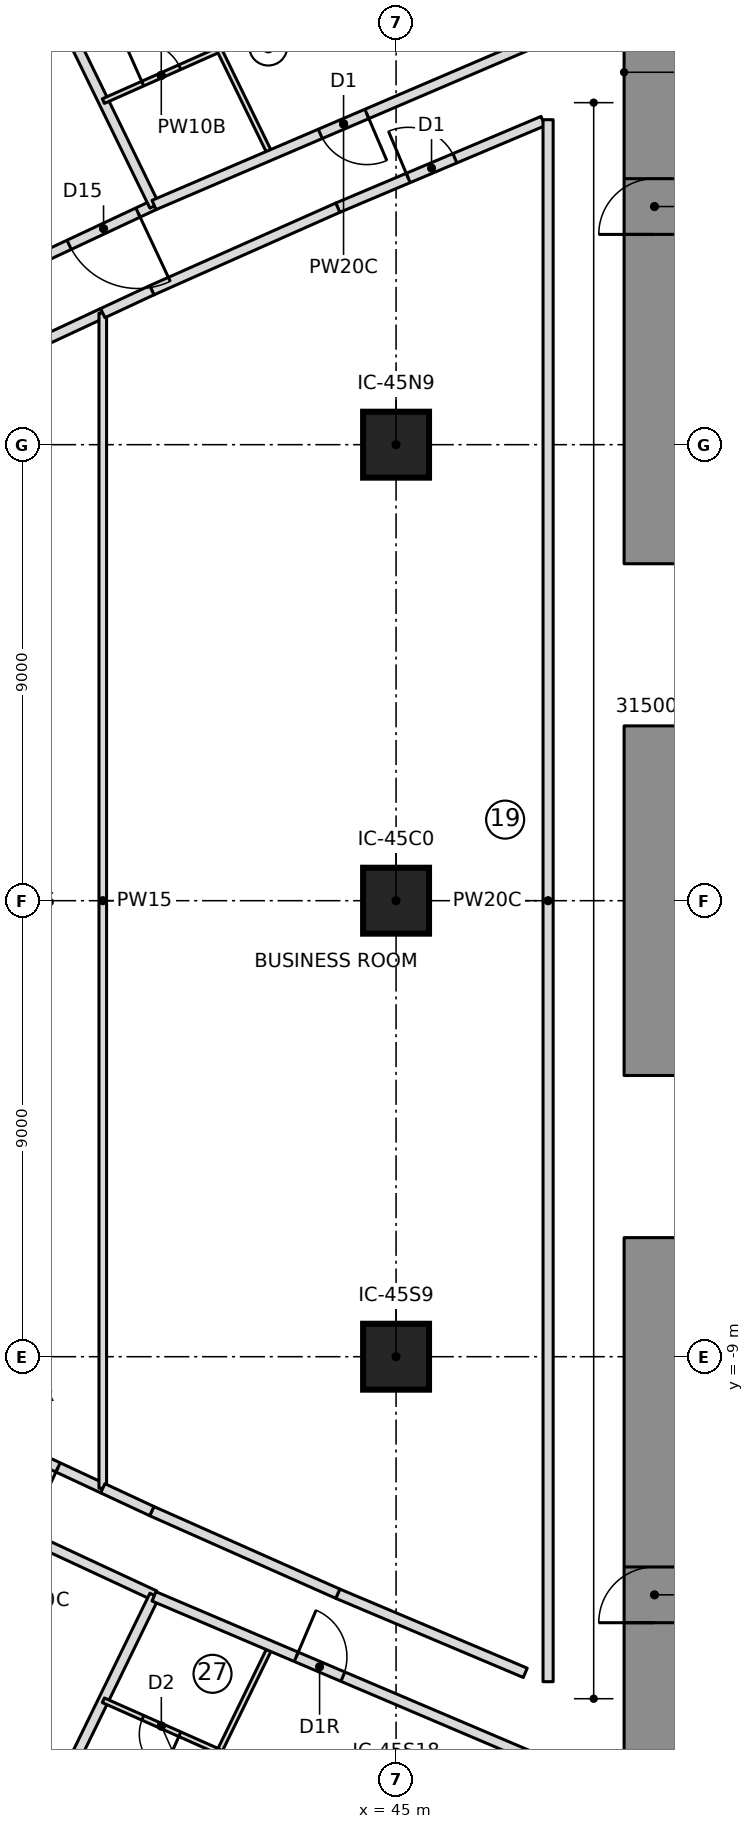
"""IFC4 building model, lengths in metres.
Left out: names, types, materials, properties, quantities, classifications, styles, units other than length and angle.
Written with IfcOpenShell. Run it as: python <this file> out.ifc"""

import sys

from ifc_helpers import new_model, si_unit, direction, frame, frame_2d, origin, origin_2d, place, context, subcontext, project, spatial, rectangle, extrude, element, fill, save


model = new_model("IFC4")
c1 = context("Model", 3, precision=1e-05, world=origin(), true_north=direction((0.0, 1.0)))
c2 = subcontext(c1, "Body", "Model", "MODEL_VIEW")
j1 = project(units=[si_unit("LENGTHUNIT", "METRE"), si_unit("PLANEANGLEUNIT", "RADIAN")], contexts=[c1])
p1 = place(None, origin())
s1 = spatial("IfcSite", under=j1, at=p1, CompositionType="ELEMENT")
p2 = place(p1, origin())
s2 = spatial("IfcBuilding", under=s1, at=p2, CompositionType="ELEMENT")
p3 = place(p2, frame((0.0, 0.0, 53.8)))
s3 = spatial("IfcBuildingStorey", under=s2, at=p3, CompositionType="ELEMENT", Elevation=53.8)
p4 = place(p3, frame((50.1, 6.65, 0.0), z_axis=(0.0, 0.0, 1.0), x_axis=(0.0, 1.0, 0.0)))
e1 = element("IfcWall", 1, at=p4, inside=s3, PredefinedType="SHEAR", context=c2, shape_type="SweptSolid", body=[
    extrude(rectangle(XDim=10.3, YDim=1.2, at=frame_2d((5.15, 0.0))), origin(), (0.0, 0.0, 1.0), 3.55),
])
p5 = place(p4, frame((6.5, 0.0, 0.0)))
e2 = element("IfcOpeningElement", 2, at=p5, cuts=e1, PredefinedType="OPENING", context=c2, shape_type="SweptSolid", body=[
    extrude(rectangle(XDim=1.1, YDim=2.1, at=frame_2d((0.55, 1.05))), frame((0.0, 0.61, 0.0), z_axis=(0.0, -1.0, 0.0), x_axis=(1.0, 0.0, 0.0)), (0.0, 0.0, 1.0), 1.22),
])
p6 = place(p3, frame((50.1, -3.45, 0.0), z_axis=(0.0, 0.0, 1.0), x_axis=(0.0, 1.0, 0.0)))
e3 = element("IfcWall", 3, at=p6, inside=s3, PredefinedType="SHEAR", context=c2, shape_type="SweptSolid", body=[
    extrude(rectangle(XDim=6.9, YDim=1.2, at=frame_2d((3.45, 0.0))), origin(), (0.0, 0.0, 1.0), 3.55),
])
p7 = place(p3, frame((50.1, -16.95, 0.0), z_axis=(0.0, 0.0, 1.0), x_axis=(0.0, 1.0, 0.0)))
e4 = element("IfcWall", 4, at=p7, inside=s3, PredefinedType="SHEAR", context=c2, shape_type="SweptSolid", body=[
    extrude(rectangle(XDim=10.3, YDim=1.2, at=frame_2d((5.15, 0.0))), origin(), (0.0, 0.0, 1.0), 3.55),
])
p8 = place(p7, frame((2.7, 0.0, 0.0)))
e5 = element("IfcOpeningElement", 5, at=p8, cuts=e4, PredefinedType="OPENING", context=c2, shape_type="SweptSolid", body=[
    extrude(rectangle(XDim=1.1, YDim=2.1, at=frame_2d((0.55, 1.05))), frame((0.0, 0.61, 0.0), z_axis=(0.0, -1.0, 0.0), x_axis=(1.0, 0.0, 0.0)), (0.0, 0.0, 1.0), 1.22),
])
for number, where, z_axis, x_axis in (
    (6, (45.0, -9.0, 0.0), (0.0, 0.0, 1.0), (1.0, 0.0, 0.0)),
    (7, (45.0, 0.0, 0.0), (0.0, 0.0, 1.0), (1.0, 0.0, 0.0)),
    (8, (45.0, 9.0, 0.0), (0.0, 0.0, 1.0), (1.0, 0.0, 0.0)),
):
    element("IfcColumn", number, at=place(p3, frame(where, z_axis=z_axis, x_axis=x_axis)), inside=s3, PredefinedType="COLUMN", context=c2, shape_type="SweptSolid", body=[
        extrude(rectangle(XDim=1.3, YDim=1.3, at=origin_2d()), origin(), (0.0, 0.0, 1.0), 3.55),
    ])
p9 = place(p3, frame((40.223, 13.73, 0.0), z_axis=(0.0, 0.0, 1.0), x_axis=(-0.905363217407, -0.424638015923, 0.0)))
e9 = element("IfcWall", 9, at=p9, inside=s3, PredefinedType="PARTITIONING", context=c2, shape_type="SweptSolid", body=[
    extrude(rectangle(XDim=6.312, YDim=0.2, at=frame_2d((3.156, 0.0))), origin(), (0.0, 0.0, 1.0), 3.25),
])
p10 = place(p9, frame((0.35, 0.0, 0.0)))
e10 = element("IfcOpeningElement", 10, at=p10, cuts=e9, PredefinedType="OPENING", context=c2, shape_type="SweptSolid", body=[
    extrude(rectangle(XDim=1.5, YDim=2.1, at=frame_2d((0.75, 1.05))), frame((0.0, 0.11, 0.0), z_axis=(0.0, -1.0, 0.0), x_axis=(1.0, 0.0, 0.0)), (0.0, 0.0, 1.0), 0.22),
])
p11 = place(p3, frame((40.232, 13.712, 0.0), z_axis=(0.0, 0.0, 1.0), x_axis=(-0.438202247191, 0.898876404494, 0.0)))
e11 = element("IfcWall", 11, at=p11, inside=s3, PredefinedType="PARTITIONING", context=c2, shape_type="SweptSolid", body=[
    extrude(rectangle(XDim=7.605, YDim=0.2, at=frame_2d((3.802, 0.0))), origin(), (0.0, 0.0, 1.0), 3.25),
])
p12 = place(p3, frame((39.223, 15.781, 0.0), z_axis=(0.0, 0.0, 1.0), x_axis=(0.914000607553, 0.405712816401, 0.0)))
e12 = element("IfcWall", 12, at=p12, inside=s3, PredefinedType="PARTITIONING", context=c2, shape_type="SweptSolid", body=[
    extrude(rectangle(XDim=2.501, YDim=0.1, at=frame_2d((1.251, 0.0))), origin(), (0.0, 0.0, 1.0), 3.25),
])
p13 = place(p12, frame((0.85, 0.0, 0.0)))
e13 = element("IfcOpeningElement", 13, at=p13, cuts=e12, PredefinedType="OPENING", context=c2, shape_type="SweptSolid", body=[
    extrude(rectangle(XDim=0.8, YDim=2.1, at=frame_2d((0.4, 1.05))), frame((0.0, 0.06, 0.0), z_axis=(0.0, -1.0, 0.0), x_axis=(1.0, 0.0, 0.0)), (0.0, 0.0, 1.0), 0.12),
])
p14 = place(p3, frame((41.51, 16.796, 0.0), z_axis=(0.0, 0.0, 1.0), x_axis=(0.4381470535, -0.898903309321, 0.0)))
e14 = element("IfcWall", 14, at=p14, inside=s3, PredefinedType="PARTITIONING", context=c2, shape_type="SweptSolid", body=[
    extrude(rectangle(XDim=2.278, YDim=0.1, at=frame_2d((1.139, 0.0))), origin(), (0.0, 0.0, 1.0), 3.25),
])
p15 = place(p3, frame((34.509, -11.05, 0.0), z_axis=(0.0, 0.0, 1.0), x_axis=(0.906710104698, -0.421754414368, 0.0)))
e15 = element("IfcWall", 15, at=p15, inside=s3, PredefinedType="PARTITIONING", context=c2, shape_type="SweptSolid", body=[
    extrude(rectangle(XDim=6.312, YDim=0.2, at=frame_2d((3.156, 0.0))), origin(), (0.0, 0.0, 1.0), 3.25),
])
p16 = place(p15, frame((0.9, 0.0, 0.0)))
e16 = element("IfcOpeningElement", 16, at=p16, cuts=e15, PredefinedType="OPENING", context=c2, shape_type="SweptSolid", body=[
    extrude(rectangle(XDim=1.5, YDim=2.1, at=frame_2d((0.75, 1.05))), frame((0.0, 0.11, 0.0), z_axis=(0.0, -1.0, 0.0), x_axis=(1.0, 0.0, 0.0)), (0.0, 0.0, 1.0), 0.22),
])
p17 = place(p3, frame((36.899, -20.548, 0.0), z_axis=(0.0, 0.0, 1.0), x_axis=(0.438202247191, 0.898876404494, 0.0)))
e17 = element("IfcWall", 17, at=p17, inside=s3, PredefinedType="PARTITIONING", context=c2, shape_type="SweptSolid", body=[
    extrude(rectangle(XDim=7.605, YDim=0.2, at=frame_2d((3.802, 0.0))), origin(), (0.0, 0.0, 1.0), 3.25),
])
p18 = place(p3, frame((42.508, -14.748, 0.0), z_axis=(0.0, 0.0, 1.0), x_axis=(-0.4381470535, -0.898903309321, 0.0)))
e18 = element("IfcWall", 18, at=p18, inside=s3, PredefinedType="PARTITIONING", context=c2, shape_type="SweptSolid", body=[
    extrude(rectangle(XDim=2.278, YDim=0.1, at=frame_2d((1.139, 0.0))), origin(), (0.0, 0.0, 1.0), 3.25),
])
p19 = place(p3, frame((41.51, -16.796, 0.0), z_axis=(0.0, 0.0, 1.0), x_axis=(-0.914000607553, 0.405712816401, 0.0)))
e19 = element("IfcWall", 19, at=p19, inside=s3, PredefinedType="PARTITIONING", context=c2, shape_type="SweptSolid", body=[
    extrude(rectangle(XDim=2.501, YDim=0.1, at=frame_2d((1.251, 0.0))), origin(), (0.0, 0.0, 1.0), 3.25),
])
p20 = place(p19, frame((0.85, 0.0, 0.0)))
e20 = element("IfcOpeningElement", 20, at=p20, cuts=e19, PredefinedType="OPENING", context=c2, shape_type="SweptSolid", body=[
    extrude(rectangle(XDim=0.8, YDim=2.1, at=frame_2d((0.4, 1.05))), frame((0.0, 0.06, 0.0), z_axis=(0.0, -1.0, 0.0), x_axis=(1.0, 0.0, 0.0)), (0.0, 0.0, 1.0), 0.12),
])
p21 = place(p3, frame((39.212, -11.597, 0.0), z_axis=(0.0, 0.0, 1.0), x_axis=(-0.906348100281, 0.422531798943, 0.0)))
e21 = element("IfcWall", 21, at=p21, inside=s3, PredefinedType="PARTITIONING", context=c2, shape_type="SweptSolid", body=[
    extrude(rectangle(XDim=2.948, YDim=0.2, at=frame_2d((1.474, 0.0))), origin(), (0.0, 0.0, 1.0), 3.25),
])
p22 = place(p21, frame((0.974, 0.0, 0.0)))
e22 = element("IfcOpeningElement", 22, at=p22, cuts=e21, PredefinedType="OPENING", context=c2, shape_type="SweptSolid", body=[
    extrude(rectangle(XDim=1.0, YDim=2.1, at=frame_2d((0.5, 1.05))), frame((0.0, 0.11, 0.0), z_axis=(0.0, -1.0, 0.0), x_axis=(1.0, 0.0, 0.0)), (0.0, 0.0, 1.0), 0.22),
])
p23 = place(p3, frame((36.54, 10.351, 0.0), z_axis=(0.0, 0.0, 1.0), x_axis=(0.906348100281, 0.422531798943, 0.0)))
e23 = element("IfcWall", 23, at=p23, inside=s3, PredefinedType="PARTITIONING", context=c2, shape_type="SweptSolid", body=[
    extrude(rectangle(XDim=2.948, YDim=0.2, at=frame_2d((1.474, 0.0))), origin(), (0.0, 0.0, 1.0), 3.25),
])
p24 = place(p3, frame((39.212, -11.597, 0.0), z_axis=(0.0, 0.0, 1.0), x_axis=(0.0, 1.0, 0.0)))
e24 = element("IfcWall", 24, at=p24, inside=s3, PredefinedType="PARTITIONING", context=c2, shape_type="SweptSolid", body=[
    extrude(rectangle(XDim=23.193, YDim=0.15, at=frame_2d((11.597, 0.0))), origin(), (0.0, 0.0, 1.0), 3.25),
])
p25 = place(p3, frame((43.85, 13.677, 0.0), z_axis=(0.0, 0.0, 1.0), x_axis=(0.921265924084, 0.388933281068, 0.0)))
e25 = element("IfcWall", 25, at=p25, inside=s3, PredefinedType="PARTITIONING", context=c2, shape_type="SweptSolid", body=[
    extrude(rectangle(XDim=4.396, YDim=0.2, at=frame_2d((2.198, 0.0))), origin(), (0.0, 0.0, 1.0), 3.25),
])
p26 = place(p25, frame((1.508, 0.0, 0.0)))
e26 = element("IfcOpeningElement", 26, at=p26, cuts=e25, PredefinedType="OPENING", context=c2, shape_type="SweptSolid", body=[
    extrude(rectangle(XDim=1.0, YDim=2.1, at=frame_2d((0.5, 1.05))), frame((0.0, 0.11, 0.0), z_axis=(0.0, -1.0, 0.0), x_axis=(1.0, 0.0, 0.0)), (0.0, 0.0, 1.0), 0.22),
])
p27 = place(p3, frame((40.18, 12.048, 0.0), z_axis=(0.0, 0.0, 1.0), x_axis=(0.913986953061, 0.405743576209, 0.0)))
e27 = element("IfcWall", 27, at=p27, inside=s3, PredefinedType="PARTITIONING", context=c2, shape_type="SweptSolid", body=[
    extrude(rectangle(XDim=4.016, YDim=0.2, at=frame_2d((2.008, 0.0))), origin(), (0.0, 0.0, 1.0), 3.25),
])
p28 = place(p3, frame((47.55, -15.239, 0.0), z_axis=(0.0, 0.0, 1.0), x_axis=(-0.921269894054, 0.388923877269, 0.0)))
e28 = element("IfcWall", 28, at=p28, inside=s3, PredefinedType="PARTITIONING", context=c2, shape_type="SweptSolid", body=[
    extrude(rectangle(XDim=4.016, YDim=0.2, at=frame_2d((2.008, 0.0))), origin(), (0.0, 0.0, 1.0), 3.25),
])
p29 = place(p3, frame((43.85, -13.677, 0.0), z_axis=(0.0, 0.0, 1.0), x_axis=(-0.913986953061, 0.405743576209, 0.0)))
e29 = element("IfcWall", 29, at=p29, inside=s3, PredefinedType="PARTITIONING", context=c2, shape_type="SweptSolid", body=[
    extrude(rectangle(XDim=4.016, YDim=0.2, at=frame_2d((2.008, 0.0))), origin(), (0.0, 0.0, 1.0), 3.25),
])
for number, where, z_axis, x_axis in (
    (30, (40.18, -12.048, 0.0), (0.0, 0.0, 1.0), (-0.906, 0.423, 0.0)),
    (31, (39.212, 11.597, 0.0), (0.0, 0.0, 1.0), (0.906, 0.423, 0.0)),
):
    element("IfcWall", number, at=place(p3, frame(where, z_axis=z_axis, x_axis=x_axis)), inside=s3, PredefinedType="PARTITIONING", context=c2, shape_type="SweptSolid", body=[
        extrude(rectangle(XDim=1.068, YDim=0.2, at=frame_2d((0.534, 0.0))), origin(), (0.0, 0.0, 1.0), 3.25),
    ])
p30 = place(p3, frame((47.704, 16.931, 0.0), z_axis=(0.0, 0.0, 1.0), x_axis=(-0.919360612497, -0.39341589214, 0.0)))
e32 = element("IfcWall", 32, at=p30, inside=s3, PredefinedType="PARTITIONING", context=c2, shape_type="SweptSolid", body=[
    extrude(rectangle(XDim=8.137, YDim=0.2, at=frame_2d((4.068, 0.0))), origin(), (0.0, 0.0, 1.0), 3.25),
])
p31 = place(p30, frame((3.568, 0.0, 0.0)))
e33 = element("IfcOpeningElement", 33, at=p31, cuts=e32, PredefinedType="OPENING", context=c2, shape_type="SweptSolid", body=[
    extrude(rectangle(XDim=1.0, YDim=2.1, at=frame_2d((0.5, 1.05))), frame((0.0, 0.11, 0.0), z_axis=(0.0, -1.0, 0.0), x_axis=(1.0, 0.0, 0.0)), (0.0, 0.0, 1.0), 0.22),
])
p32 = place(p3, frame((40.223, -13.73, 0.0), z_axis=(0.0, 0.0, 1.0), x_axis=(0.920292261621, -0.391231585127, 0.0)))
e34 = element("IfcWall", 34, at=p32, inside=s3, PredefinedType="PARTITIONING", context=c2, shape_type="SweptSolid", body=[
    extrude(rectangle(XDim=8.129, YDim=0.2, at=frame_2d((4.064, 0.0))), origin(), (0.0, 0.0, 1.0), 3.25),
])
p33 = place(p32, frame((3.05, 0.0, 0.0)))
e35 = element("IfcOpeningElement", 35, at=p33, cuts=e34, PredefinedType="OPENING", context=c2, shape_type="SweptSolid", body=[
    extrude(rectangle(XDim=1.0, YDim=2.1, at=frame_2d((0.5, 1.05))), frame((0.0, 0.11, 0.0), z_axis=(0.0, -1.0, 0.0), x_axis=(1.0, 0.0, 0.0)), (0.0, 0.0, 1.0), 0.22),
])
p34 = place(p3, frame((48.0, 15.414, 0.0), z_axis=(0.0, 0.0, 1.0), x_axis=(0.0, -1.0, 0.0)))
e36 = element("IfcWall", 36, at=p34, inside=s3, PredefinedType="PARTITIONING", context=c2, shape_type="SweptSolid", body=[
    extrude(rectangle(XDim=30.828, YDim=0.2, at=frame_2d((15.414, 0.0))), origin(), (0.0, 0.0, 1.0), 3.25),
])
p35 = place(p10, origin())
e37 = element("IfcDoor", 37, at=p35, inside=s3, OperationType="DOUBLE_DOOR_SINGLE_SWING", PredefinedType="DOOR", context=c2, shape_type="SweptSolid", body=[
    extrude(rectangle(XDim=1.5, YDim=2.1, at=frame_2d((0.75, 1.05))), frame((0.0, 0.025, 0.0), z_axis=(0.0, -1.0, 0.0), x_axis=(1.0, 0.0, 0.0)), (0.0, 0.0, 1.0), 0.05),
])
fill(e10, e37)
p36 = place(p13, origin())
e38 = element("IfcDoor", 38, at=p36, inside=s3, OperationType="SINGLE_SWING_LEFT", PredefinedType="DOOR", context=c2, shape_type="SweptSolid", body=[
    extrude(rectangle(XDim=0.8, YDim=2.1, at=frame_2d((0.4, 1.05))), frame((0.0, 0.025, 0.0), z_axis=(0.0, -1.0, 0.0), x_axis=(1.0, 0.0, 0.0)), (0.0, 0.0, 1.0), 0.05),
])
fill(e13, e38)
p37 = place(p31, origin())
e39 = element("IfcDoor", 39, at=p37, inside=s3, OperationType="SINGLE_SWING_LEFT", PredefinedType="DOOR", context=c2, shape_type="SweptSolid", body=[
    extrude(rectangle(XDim=1.0, YDim=2.1, at=frame_2d((0.5, 1.05))), frame((0.0, 0.025, 0.0), z_axis=(0.0, -1.0, 0.0), x_axis=(1.0, 0.0, 0.0)), (0.0, 0.0, 1.0), 0.05),
])
fill(e33, e39)
p38 = place(p20, origin())
e40 = element("IfcDoor", 40, at=p38, inside=s3, OperationType="SINGLE_SWING_LEFT", PredefinedType="DOOR", context=c2, shape_type="SweptSolid", body=[
    extrude(rectangle(XDim=0.8, YDim=2.1, at=frame_2d((0.4, 1.05))), frame((0.0, 0.025, 0.0), z_axis=(0.0, -1.0, 0.0), x_axis=(1.0, 0.0, 0.0)), (0.0, 0.0, 1.0), 0.05),
])
fill(e20, e40)
p39 = place(p33, origin())
e41 = element("IfcDoor", 41, at=p39, inside=s3, OperationType="SINGLE_SWING_RIGHT", PredefinedType="DOOR", context=c2, shape_type="SweptSolid", body=[
    extrude(rectangle(XDim=1.0, YDim=2.1, at=frame_2d((0.5, 1.05))), frame((0.0, 0.025, 0.0), z_axis=(0.0, -1.0, 0.0), x_axis=(1.0, 0.0, 0.0)), (0.0, 0.0, 1.0), 0.05),
])
fill(e35, e41)
p40 = place(p22, origin())
e42 = element("IfcDoor", 42, at=p40, inside=s3, OperationType="SINGLE_SWING_RIGHT", PredefinedType="DOOR", context=c2, shape_type="SweptSolid", body=[
    extrude(rectangle(XDim=1.0, YDim=2.1, at=frame_2d((0.5, 1.05))), frame((0.0, 0.025, 0.0), z_axis=(0.0, -1.0, 0.0), x_axis=(1.0, 0.0, 0.0)), (0.0, 0.0, 1.0), 0.05),
])
fill(e22, e42)
p41 = place(p26, origin())
e43 = element("IfcDoor", 43, at=p41, inside=s3, OperationType="SINGLE_SWING_LEFT", PredefinedType="DOOR", context=c2, shape_type="SweptSolid", body=[
    extrude(rectangle(XDim=1.0, YDim=2.1, at=frame_2d((0.5, 1.05))), frame((0.0, 0.025, 0.0), z_axis=(0.0, -1.0, 0.0), x_axis=(1.0, 0.0, 0.0)), (0.0, 0.0, 1.0), 0.05),
])
fill(e26, e43)
p42 = place(p5, origin())
e44 = element("IfcDoor", 44, at=p42, inside=s3, OperationType="SINGLE_SWING_RIGHT", PredefinedType="DOOR", context=c2, shape_type="SweptSolid", body=[
    extrude(rectangle(XDim=1.1, YDim=2.1, at=frame_2d((0.55, 1.05))), frame((0.0, 0.025, 0.0), z_axis=(0.0, -1.0, 0.0), x_axis=(1.0, 0.0, 0.0)), (0.0, 0.0, 1.0), 0.05),
])
fill(e2, e44)
p43 = place(p8, origin())
e45 = element("IfcDoor", 45, at=p43, inside=s3, OperationType="SINGLE_SWING_RIGHT", PredefinedType="DOOR", context=c2, shape_type="SweptSolid", body=[
    extrude(rectangle(XDim=1.1, YDim=2.1, at=frame_2d((0.55, 1.05))), frame((0.0, 0.025, 0.0), z_axis=(0.0, -1.0, 0.0), x_axis=(1.0, 0.0, 0.0)), (0.0, 0.0, 1.0), 0.05),
])
fill(e5, e45)
save(model, sys.argv[1])
